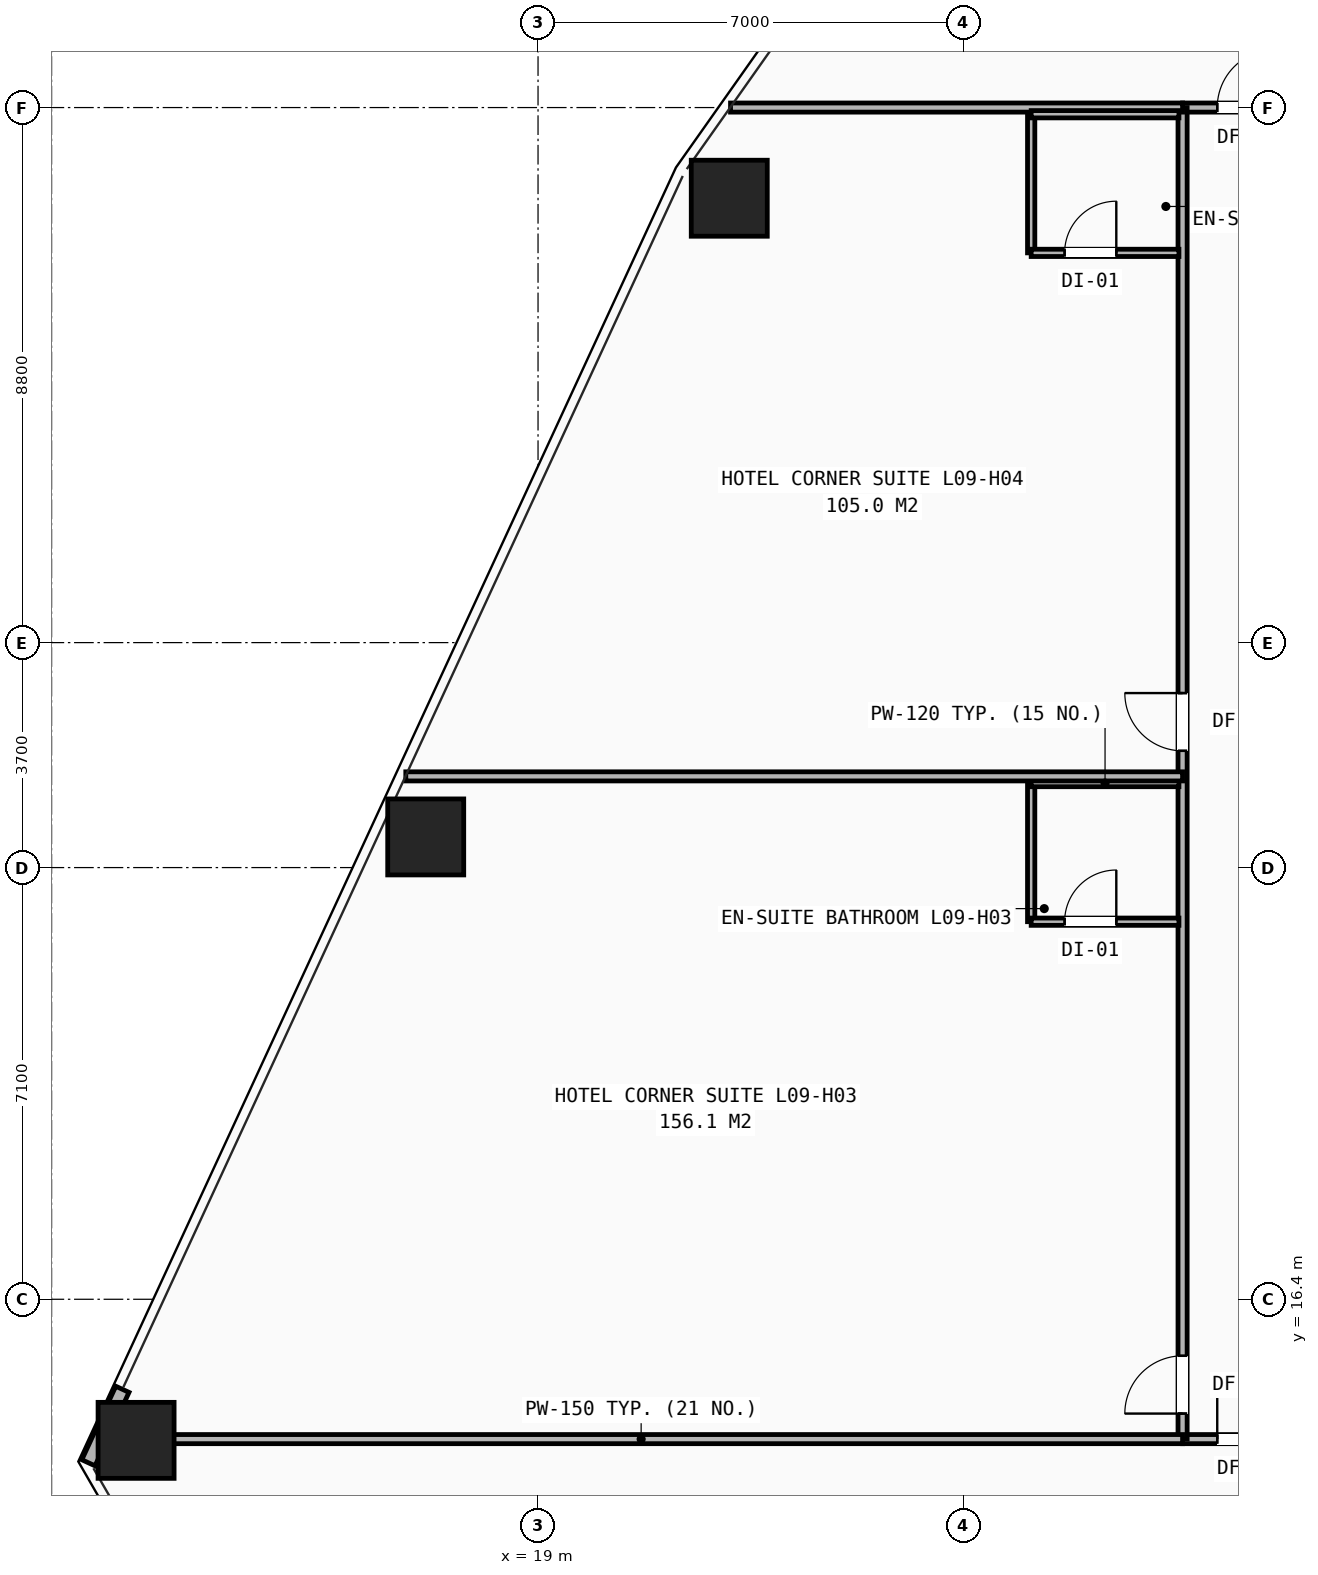
"""IFC4 building model, lengths in metres.
Left out: names, types, materials, properties, quantities, classifications, styles, units other than length and angle.
Written with IfcOpenShell. Run it as: python <this file> out.ifc"""

import sys

from ifc_helpers import new_model, si_unit, direction, frame, frame_2d, origin, origin_2d, place, context, subcontext, project, spatial, rectangle, hollow_rectangle, extrude, element, fill, save


model = new_model("IFC4")
c1 = context("Model", 3, precision=1e-05, world=origin(), true_north=direction((0.0, 1.0)))
c2 = subcontext(c1, "Body", "Model", "MODEL_VIEW")
j1 = project(units=[si_unit("LENGTHUNIT", "METRE"), si_unit("PLANEANGLEUNIT", "RADIAN")], contexts=[c1])
p1 = place(None, origin())
s1 = spatial("IfcSite", under=j1, at=p1, CompositionType="ELEMENT")
p2 = place(p1, origin())
s2 = spatial("IfcBuilding", under=s1, at=p2, CompositionType="ELEMENT")
p3 = place(p2, frame((0.0, 0.0, 36.8)))
s3 = spatial("IfcBuildingStorey", under=s2, at=p3, CompositionType="ELEMENT", Elevation=36.8)
for number, where, z_axis, x_axis in (
    (1, (22.145, 34.509, 0.0), (0.0, 0.0, 1.0), (1.0, 0.0, 0.0)),
    (2, (17.153, 24.004, 0.0), (0.0, 0.0, 1.0), (1.0, 0.0, 0.0)),
    (3, (12.389, 14.08, 0.0), (0.0, 0.0, 1.0), (1.0, 0.0, 0.0)),
):
    element("IfcColumn", number, at=place(p3, frame(where, z_axis=z_axis, x_axis=x_axis)), inside=s3, PredefinedType="COLUMN", context=c2, shape_type="SweptSolid", body=[
        extrude(hollow_rectangle(XDim=1.25, YDim=1.25, WallThickness=0.08, at=origin_2d()), origin(), (0.0, 0.0, 1.0), 3.2),
    ])
p4 = place(p3, frame((12.164, 14.919, 0.0), z_axis=(0.0, 0.0, 1.0), x_axis=(-0.419348851808, -0.907825170662, 0.0)))
e4 = element("IfcWall", 4, at=p4, inside=s3, PredefinedType="SHEAR", context=c2, shape_type="SweptSolid", body=[
    extrude(rectangle(XDim=1.332, YDim=0.24, at=frame_2d((0.666, 0.0))), origin(), (0.0, 0.0, 1.0), 2.263),
])
p5 = place(p3, frame((29.6, 14.1, 0.0), z_axis=(0.0, 0.0, 1.0), x_axis=(1.0, 0.0, 0.0)))
e5 = element("IfcWall", 5, at=p5, inside=s3, PredefinedType="PARTITIONING", context=c2, shape_type="SweptSolid", body=[
    extrude(rectangle(XDim=20.8, YDim=0.15, at=frame_2d((10.4, 0.0))), origin(), (0.0, 0.0, 1.0), 2.431),
])
p6 = place(p5, frame((0.57, 0.0, 0.0)))
e6 = element("IfcOpeningElement", 6, at=p6, cuts=e5, PredefinedType="OPENING", context=c2, shape_type="SweptSolid", body=[
    extrude(rectangle(XDim=0.95, YDim=2.1, at=frame_2d((0.475, 1.05))), frame((0.0, 0.085, 0.0), z_axis=(0.0, -1.0, 0.0), x_axis=(1.0, 0.0, 0.0)), (0.0, 0.0, 1.0), 0.17),
])
p7 = place(p5, frame((10.32, 0.0, 0.0)))
e7 = element("IfcOpeningElement", 7, at=p7, cuts=e5, PredefinedType="OPENING", context=c2, shape_type="SweptSolid", body=[
    extrude(rectangle(XDim=0.95, YDim=2.1, at=frame_2d((0.475, 1.05))), frame((0.0, 0.085, 0.0), z_axis=(0.0, -1.0, 0.0), x_axis=(1.0, 0.0, 0.0)), (0.0, 0.0, 1.0), 0.17),
])
p8 = place(p3, frame((29.6, 36.0, 0.0), z_axis=(0.0, 0.0, 1.0), x_axis=(1.0, 0.0, 0.0)))
e8 = element("IfcWall", 8, at=p8, inside=s3, PredefinedType="PARTITIONING", context=c2, shape_type="SweptSolid", body=[
    extrude(rectangle(XDim=9.65, YDim=0.15, at=frame_2d((4.825, 0.0))), origin(), (0.0, 0.0, 1.0), 2.98),
])
p9 = place(p8, frame((0.57, 0.0, 0.0)))
e9 = element("IfcOpeningElement", 9, at=p9, cuts=e8, PredefinedType="OPENING", context=c2, shape_type="SweptSolid", body=[
    extrude(rectangle(XDim=0.95, YDim=2.1, at=frame_2d((0.475, 1.05))), frame((0.0, 0.085, 0.0), z_axis=(0.0, -1.0, 0.0), x_axis=(1.0, 0.0, 0.0)), (0.0, 0.0, 1.0), 0.17),
])
p10 = place(p3, frame((29.6, 14.1, 0.0), z_axis=(0.0, 0.0, 1.0), x_axis=(0.0, 1.0, 0.0)))
e10 = element("IfcWall", 10, at=p10, inside=s3, PredefinedType="PARTITIONING", context=c2, shape_type="SweptSolid", body=[
    extrude(rectangle(XDim=21.9, YDim=0.15, at=frame_2d((10.95, 0.0))), origin(), (0.0, 0.0, 1.0), 2.431),
])
p11 = place(p10, frame((0.42, 0.0, 0.0)))
e11 = element("IfcOpeningElement", 11, at=p11, cuts=e10, PredefinedType="OPENING", context=c2, shape_type="SweptSolid", body=[
    extrude(rectangle(XDim=0.95, YDim=2.1, at=frame_2d((0.475, 1.05))), frame((0.0, 0.085, 0.0), z_axis=(0.0, -1.0, 0.0), x_axis=(1.0, 0.0, 0.0)), (0.0, 0.0, 1.0), 0.17),
])
p12 = place(p10, frame((11.32, 0.0, 0.0)))
e12 = element("IfcOpeningElement", 12, at=p12, cuts=e10, PredefinedType="OPENING", context=c2, shape_type="SweptSolid", body=[
    extrude(rectangle(XDim=0.95, YDim=2.1, at=frame_2d((0.475, 1.05))), frame((0.0, 0.085, 0.0), z_axis=(0.0, -1.0, 0.0), x_axis=(1.0, 0.0, 0.0)), (0.0, 0.0, 1.0), 0.17),
])
p13 = place(p3, frame((11.791, 14.1, 0.0), z_axis=(0.0, 0.0, 1.0), x_axis=(1.0, 0.0, 0.0)))
e13 = element("IfcWall", 13, at=p13, inside=s3, PredefinedType="PARTITIONING", context=c2, shape_type="SweptSolid", body=[
    extrude(rectangle(XDim=17.809, YDim=0.15, at=frame_2d((8.904, 0.0))), origin(), (0.0, 0.0, 1.0), 2.268),
])
p14 = place(p3, frame((22.166, 36.0, 0.0), z_axis=(0.0, 0.0, 1.0), x_axis=(1.0, 0.0, 0.0)))
e14 = element("IfcWall", 14, at=p14, inside=s3, PredefinedType="PARTITIONING", context=c2, shape_type="SweptSolid", body=[
    extrude(rectangle(XDim=7.434, YDim=0.15, at=frame_2d((3.717, 0.0))), origin(), (0.0, 0.0, 1.0), 2.268),
])
p15 = place(p3, frame((27.11, 22.61, 0.0), z_axis=(0.0, 0.0, 1.0), x_axis=(0.0, 1.0, 0.0)))
e15 = element("IfcWall", 15, at=p15, inside=s3, PredefinedType="PARTITIONING", context=c2, shape_type="SweptSolid", body=[
    extrude(rectangle(XDim=2.28, YDim=0.12, at=frame_2d((1.14, 0.0))), origin(), (0.0, 0.0, 1.0), 2.98),
])
p16 = place(p3, frame((27.11, 22.61, 0.0), z_axis=(0.0, 0.0, 1.0), x_axis=(1.0, 0.0, 0.0)))
e16 = element("IfcWall", 16, at=p16, inside=s3, PredefinedType="PARTITIONING", context=c2, shape_type="SweptSolid", body=[
    extrude(rectangle(XDim=2.43, YDim=0.12, at=frame_2d((1.215, 0.0))), origin(), (0.0, 0.0, 1.0), 2.98),
])
p17 = place(p16, frame((0.55, 0.0, 0.0)))
e17 = element("IfcOpeningElement", 17, at=p17, cuts=e16, PredefinedType="OPENING", context=c2, shape_type="SweptSolid", body=[
    extrude(rectangle(XDim=0.85, YDim=2.05, at=frame_2d((0.425, 1.025))), frame((0.0, 0.07, 0.0), z_axis=(0.0, -1.0, 0.0), x_axis=(1.0, 0.0, 0.0)), (0.0, 0.0, 1.0), 0.14),
])
p18 = place(p3, frame((27.11, 24.89, 0.0), z_axis=(0.0, 0.0, 1.0), x_axis=(1.0, 0.0, 0.0)))
e18 = element("IfcWall", 18, at=p18, inside=s3, PredefinedType="PARTITIONING", context=c2, shape_type="SweptSolid", body=[
    extrude(rectangle(XDim=2.43, YDim=0.12, at=frame_2d((1.215, 0.0))), origin(), (0.0, 0.0, 1.0), 2.98),
])
p19 = place(p3, frame((16.825, 25.0, 0.0), z_axis=(0.0, 0.0, 1.0), x_axis=(1.0, 0.0, 0.0)))
e19 = element("IfcWall", 19, at=p19, inside=s3, PredefinedType="PARTITIONING", context=c2, shape_type="SweptSolid", body=[
    extrude(rectangle(XDim=12.775, YDim=0.15, at=frame_2d((6.387, 0.0))), origin(), (0.0, 0.0, 1.0), 2.268),
])
p20 = place(p3, frame((27.11, 33.61, 0.0), z_axis=(0.0, 0.0, 1.0), x_axis=(0.0, 1.0, 0.0)))
e20 = element("IfcWall", 20, at=p20, inside=s3, PredefinedType="PARTITIONING", context=c2, shape_type="SweptSolid", body=[
    extrude(rectangle(XDim=2.28, YDim=0.12, at=frame_2d((1.14, 0.0))), origin(), (0.0, 0.0, 1.0), 2.513),
])
p21 = place(p3, frame((27.11, 33.61, 0.0), z_axis=(0.0, 0.0, 1.0), x_axis=(1.0, 0.0, 0.0)))
e21 = element("IfcWall", 21, at=p21, inside=s3, PredefinedType="PARTITIONING", context=c2, shape_type="SweptSolid", body=[
    extrude(rectangle(XDim=2.43, YDim=0.12, at=frame_2d((1.215, 0.0))), origin(), (0.0, 0.0, 1.0), 2.513),
])
p22 = place(p21, frame((0.55, 0.0, 0.0)))
e22 = element("IfcOpeningElement", 22, at=p22, cuts=e21, PredefinedType="OPENING", context=c2, shape_type="SweptSolid", body=[
    extrude(rectangle(XDim=0.85, YDim=2.05, at=frame_2d((0.425, 1.025))), frame((0.0, 0.07, 0.0), z_axis=(0.0, -1.0, 0.0), x_axis=(1.0, 0.0, 0.0)), (0.0, 0.0, 1.0), 0.14),
])
p23 = place(p3, frame((27.11, 35.89, 0.0), z_axis=(0.0, 0.0, 1.0), x_axis=(1.0, 0.0, 0.0)))
e23 = element("IfcWall", 23, at=p23, inside=s3, PredefinedType="PARTITIONING", context=c2, shape_type="SweptSolid", body=[
    extrude(rectangle(XDim=2.43, YDim=0.12, at=frame_2d((1.215, 0.0))), origin(), (0.0, 0.0, 1.0), 2.513),
])
p24 = place(p6, origin())
e24 = element("IfcDoor", 24, at=p24, inside=s3, OperationType="SINGLE_SWING_LEFT", PredefinedType="DOOR", context=c2, shape_type="SweptSolid", body=[
    extrude(rectangle(XDim=0.95, YDim=2.1, at=frame_2d((0.475, 1.05))), frame((0.0, 0.025, 0.0), z_axis=(0.0, -1.0, 0.0), x_axis=(1.0, 0.0, 0.0)), (0.0, 0.0, 1.0), 0.05),
])
fill(e6, e24)
p25 = place(p11, origin())
e25 = element("IfcDoor", 25, at=p25, inside=s3, OperationType="SINGLE_SWING_LEFT", PredefinedType="DOOR", context=c2, shape_type="SweptSolid", body=[
    extrude(rectangle(XDim=0.95, YDim=2.1, at=frame_2d((0.475, 1.05))), frame((0.0, 0.025, 0.0), z_axis=(0.0, -1.0, 0.0), x_axis=(1.0, 0.0, 0.0)), (0.0, 0.0, 1.0), 0.05),
])
fill(e11, e25)
p26 = place(p17, origin())
e26 = element("IfcDoor", 26, at=p26, inside=s3, OperationType="SINGLE_SWING_RIGHT", PredefinedType="DOOR", context=c2, shape_type="SweptSolid", body=[
    extrude(rectangle(XDim=0.85, YDim=2.05, at=frame_2d((0.425, 1.025))), frame((0.0, 0.025, 0.0), z_axis=(0.0, -1.0, 0.0), x_axis=(1.0, 0.0, 0.0)), (0.0, 0.0, 1.0), 0.05),
])
fill(e17, e26)
p27 = place(p12, origin())
e27 = element("IfcDoor", 27, at=p27, inside=s3, OperationType="SINGLE_SWING_RIGHT", PredefinedType="DOOR", context=c2, shape_type="SweptSolid", body=[
    extrude(rectangle(XDim=0.95, YDim=2.1, at=frame_2d((0.475, 1.05))), frame((0.0, 0.025, 0.0), z_axis=(0.0, -1.0, 0.0), x_axis=(1.0, 0.0, 0.0)), (0.0, 0.0, 1.0), 0.05),
])
fill(e12, e27)
p28 = place(p22, origin())
e28 = element("IfcDoor", 28, at=p28, inside=s3, OperationType="SINGLE_SWING_RIGHT", PredefinedType="DOOR", context=c2, shape_type="SweptSolid", body=[
    extrude(rectangle(XDim=0.85, YDim=2.05, at=frame_2d((0.425, 1.025))), frame((0.0, 0.025, 0.0), z_axis=(0.0, -1.0, 0.0), x_axis=(1.0, 0.0, 0.0)), (0.0, 0.0, 1.0), 0.05),
])
fill(e22, e28)
p29 = place(p9, origin())
e29 = element("IfcDoor", 29, at=p29, inside=s3, OperationType="SINGLE_SWING_RIGHT", PredefinedType="DOOR", context=c2, shape_type="SweptSolid", body=[
    extrude(rectangle(XDim=0.95, YDim=2.1, at=frame_2d((0.475, 1.05))), frame((0.0, 0.025, 0.0), z_axis=(0.0, -1.0, 0.0), x_axis=(1.0, 0.0, 0.0)), (0.0, 0.0, 1.0), 0.05),
])
fill(e9, e29)
save(model, sys.argv[1])
